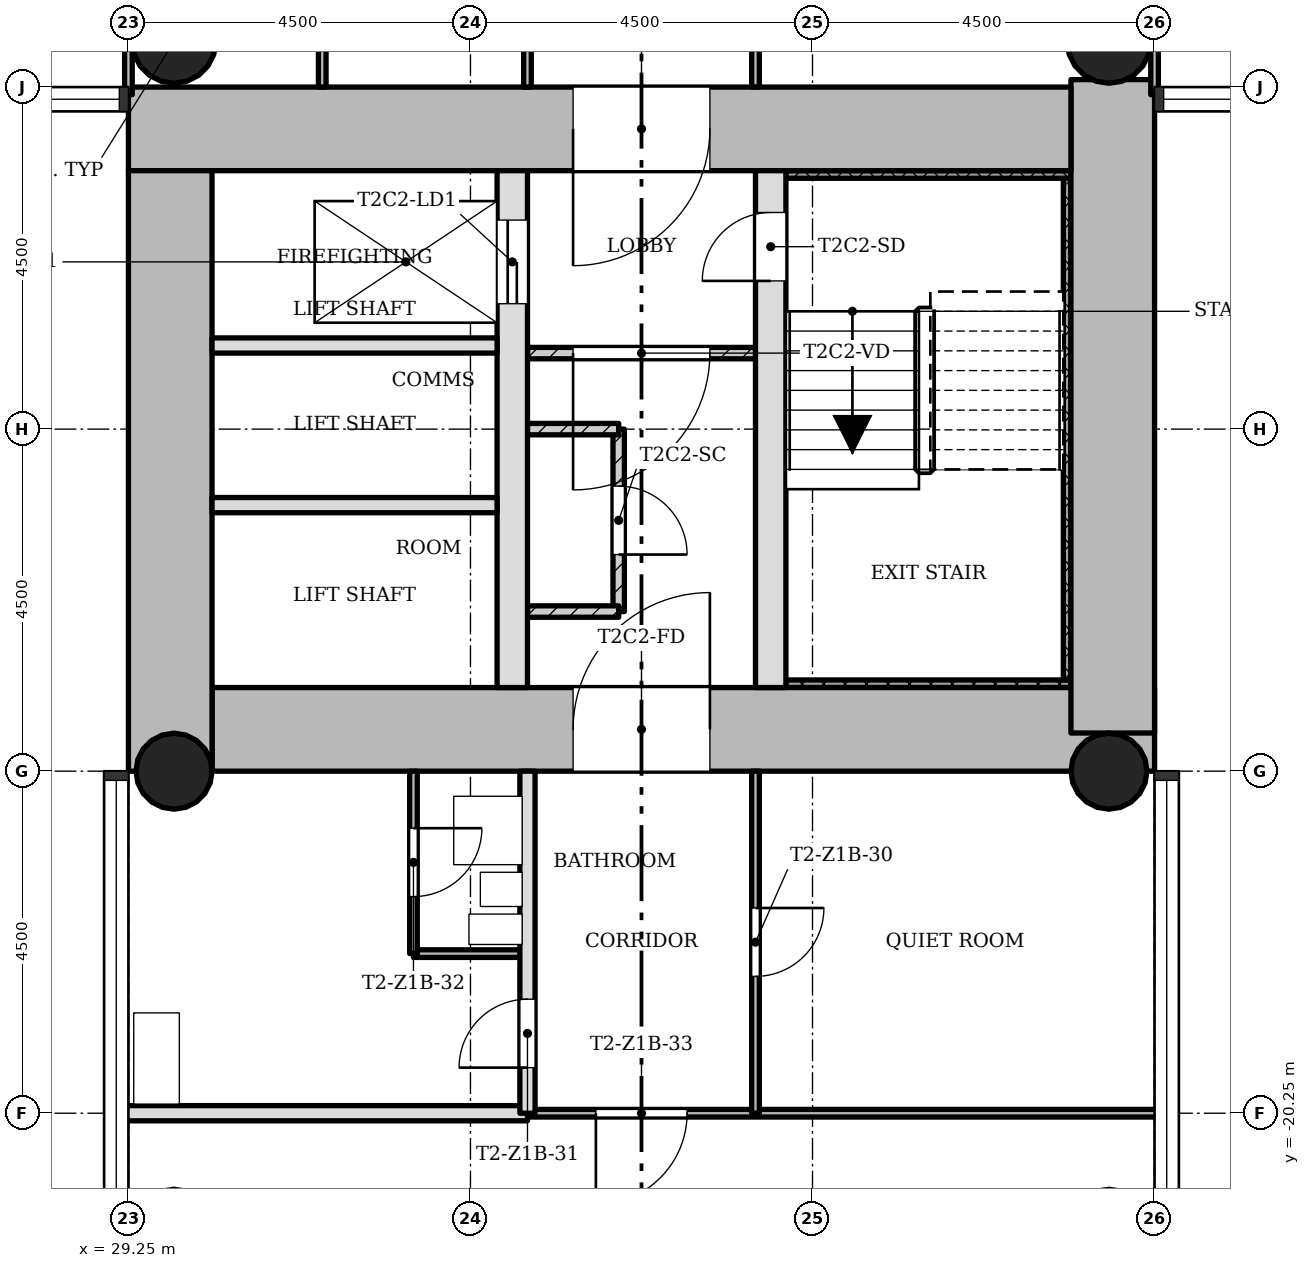
"""IFC4 building model, lengths in metres.
Left out: names, types, materials, properties, quantities, classifications, styles, units other than length and angle.
Written with IfcOpenShell. Run it as: python <this file> out.ifc"""

import sys

from ifc_helpers import new_model, si_unit, direction, frame, frame_2d, origin, origin_2d, place, context, subcontext, project, spatial, rectangle, hollow_circle, extrude, element, fill, save


model = new_model("IFC4")
c1 = context("Model", 3, precision=1e-05, world=origin(), true_north=direction((0.0, 1.0)))
c2 = subcontext(c1, "Body", "Model", "MODEL_VIEW")
j1 = project(units=[si_unit("LENGTHUNIT", "METRE"), si_unit("PLANEANGLEUNIT", "RADIAN")], contexts=[c1])
p1 = place(None, origin())
s1 = spatial("IfcSite", under=j1, at=p1, CompositionType="ELEMENT")
p2 = place(p1, origin())
s2 = spatial("IfcBuilding", under=s1, at=p2, CompositionType="ELEMENT")
p3 = place(p2, frame((0.0, 0.0, 41.5)))
s3 = spatial("IfcBuildingStorey", under=s2, at=p3, CompositionType="ELEMENT", Elevation=41.5)
p4 = place(p3, frame((30.35, -15.2, 0.0), z_axis=(0.0, 0.0, 1.0), x_axis=(1.0, 0.0, 0.0)))
e1 = element("IfcWall", 1, at=p4, inside=s3, PredefinedType="SHEAR", context=c2, shape_type="SweptSolid", body=[
    extrude(rectangle(XDim=12.4, YDim=1.1, at=frame_2d((6.2, 0.0))), origin(), (0.0, 0.0, 1.0), 3.4),
])
p5 = place(p4, frame((4.75, 0.0, 0.0)))
e2 = element("IfcOpeningElement", 2, at=p5, cuts=e1, PredefinedType="OPENING", context=c2, shape_type="SweptSolid", body=[
    extrude(rectangle(XDim=1.8, YDim=2.1, at=frame_2d((0.9, 1.05))), frame((0.0, 0.56, 0.0), z_axis=(0.0, -1.0, 0.0), x_axis=(1.0, 0.0, 0.0)), (0.0, 0.0, 1.0), 1.12),
])
p6 = place(p3, frame((42.2, -15.248, 0.0), z_axis=(0.0, 0.0, 1.0), x_axis=(0.0, 1.0, 0.0)))
e3 = element("IfcWall", 3, at=p6, inside=s3, PredefinedType="SHEAR", context=c2, shape_type="SweptSolid", body=[
    extrude(rectangle(XDim=8.596, YDim=1.1, at=frame_2d((4.298, 0.0))), origin(), (0.0, 0.0, 1.0), 3.4),
])
p7 = place(p3, frame((41.65, -7.3, 0.0), z_axis=(0.0, 0.0, 1.0), x_axis=(-1.0, 0.0, 0.0)))
e4 = element("IfcWall", 4, at=p7, inside=s3, PredefinedType="SHEAR", context=c2, shape_type="SweptSolid", body=[
    extrude(rectangle(XDim=12.4, YDim=1.1, at=frame_2d((6.2, 0.0))), origin(), (0.0, 0.0, 1.0), 3.4),
])
p8 = place(p7, frame((4.75, 0.0, 0.0)))
e5 = element("IfcOpeningElement", 5, at=p8, cuts=e4, PredefinedType="OPENING", context=c2, shape_type="SweptSolid", body=[
    extrude(rectangle(XDim=1.8, YDim=2.1, at=frame_2d((0.9, 1.05))), frame((0.0, 0.56, 0.0), z_axis=(0.0, -1.0, 0.0), x_axis=(1.0, 0.0, 0.0)), (0.0, 0.0, 1.0), 1.12),
])
p9 = place(p3, frame((29.8, -7.85, 0.0), z_axis=(0.0, 0.0, 1.0), x_axis=(0.0, -1.0, 0.0)))
e6 = element("IfcWall", 6, at=p9, inside=s3, PredefinedType="SHEAR", context=c2, shape_type="SweptSolid", body=[
    extrude(rectangle(XDim=7.9, YDim=1.1, at=frame_2d((3.95, 0.0))), origin(), (0.0, 0.0, 1.0), 3.4),
])
p10 = place(p3, frame((34.3, -14.65, 0.0), z_axis=(0.0, 0.0, 1.0), x_axis=(0.0, 1.0, 0.0)))
e7 = element("IfcWall", 7, at=p10, inside=s3, PredefinedType="SHEAR", context=c2, shape_type="SweptSolid", body=[
    extrude(rectangle(XDim=6.8, YDim=0.4, at=frame_2d((3.4, 0.0))), origin(), (0.0, 0.0, 1.0), 3.4),
])
p11 = place(p10, frame((5.05, 0.0, 0.0)))
e8 = element("IfcOpeningElement", 8, at=p11, cuts=e7, PredefinedType="OPENING", context=c2, shape_type="SweptSolid", body=[
    extrude(rectangle(XDim=1.1, YDim=2.1, at=frame_2d((0.55, 1.05))), frame((0.0, 0.21, 0.0), z_axis=(0.0, -1.0, 0.0), x_axis=(1.0, 0.0, 0.0)), (0.0, 0.0, 1.0), 0.42),
])
p12 = place(p3, frame((37.7, -14.65, 0.0), z_axis=(0.0, 0.0, 1.0), x_axis=(0.0, 1.0, 0.0)))
e9 = element("IfcWall", 9, at=p12, inside=s3, PredefinedType="SHEAR", context=c2, shape_type="SweptSolid", body=[
    extrude(rectangle(XDim=6.8, YDim=0.4, at=frame_2d((3.4, 0.0))), origin(), (0.0, 0.0, 1.0), 3.4),
])
p13 = place(p12, frame((5.35, 0.0, 0.0)))
e10 = element("IfcOpeningElement", 10, at=p13, cuts=e9, PredefinedType="OPENING", context=c2, shape_type="SweptSolid", body=[
    extrude(rectangle(XDim=0.9, YDim=2.1, at=frame_2d((0.45, 1.05))), frame((0.0, 0.21, 0.0), z_axis=(0.0, -1.0, 0.0), x_axis=(1.0, 0.0, 0.0)), (0.0, 0.0, 1.0), 0.42),
])
for number, where, z_axis, x_axis in (
    (11, (42.15, -15.75, 0.0), (0.0, 0.0, 1.0), (1.0, 0.0, 0.0)),
    (12, (29.85, -15.75, 0.0), (0.0, 0.0, 1.0), (1.0, 0.0, 0.0)),
):
    element("IfcColumn", number, at=place(p3, frame(where, z_axis=z_axis, x_axis=x_axis)), inside=s3, PredefinedType="COLUMN", context=c2, shape_type="SweptSolid", body=[
        extrude(hollow_circle(Radius=0.5, WallThickness=0.036, at=origin_2d()), origin(), (0.0, 0.0, 1.0), 3.4),
    ])
for number, where, z_axis, x_axis in (
    (13, (42.15, -6.15, 0.0), (0.0, 0.0, 1.0), (1.0, 0.0, 0.0)),
    (14, (29.85, -6.15, 0.0), (0.0, 0.0, 1.0), (1.0, 0.0, 0.0)),
):
    element("IfcColumn", number, at=place(p3, frame(where, z_axis=z_axis, x_axis=x_axis)), inside=s3, PredefinedType="COLUMN", context=c2, shape_type="SweptSolid", body=[
        extrude(hollow_circle(Radius=0.55, WallThickness=0.04, at=origin_2d()), origin(), (0.0, 0.0, 1.0), 3.4),
    ])
p14 = place(p3, frame((34.5, -10.25, 0.0), z_axis=(0.0, 0.0, 1.0), x_axis=(1.0, 0.0, 0.0)))
e15 = element("IfcWall", 15, at=p14, inside=s3, PredefinedType="PARTITIONING", context=c2, shape_type="SweptSolid", body=[
    extrude(rectangle(XDim=3.0, YDim=0.15, at=frame_2d((1.5, 0.0))), origin(), (0.0, 0.0, 1.0), 3.0),
])
p15 = place(p14, frame((0.6, 0.0, 0.0)))
e16 = element("IfcOpeningElement", 16, at=p15, cuts=e15, PredefinedType="OPENING", context=c2, shape_type="SweptSolid", body=[
    extrude(rectangle(XDim=1.8, YDim=2.1, at=frame_2d((0.9, 1.05))), frame((0.0, 0.085, 0.0), z_axis=(0.0, -1.0, 0.0), x_axis=(1.0, 0.0, 0.0)), (0.0, 0.0, 1.0), 0.17),
])
for number, where, z_axis, x_axis in (
    (17, (30.35, -10.15, 0.0), (0.0, 0.0, 1.0), (1.0, 0.0, 0.0)),
    (18, (30.35, -12.25, 0.0), (0.0, 0.0, 1.0), (1.0, 0.0, 0.0)),
):
    element("IfcWall", number, at=place(p3, frame(where, z_axis=z_axis, x_axis=x_axis)), inside=s3, PredefinedType="SOLIDWALL", context=c2, shape_type="SweptSolid", body=[
        extrude(rectangle(XDim=3.75, YDim=0.2, at=frame_2d((1.875, 0.0))), origin(), (0.0, 0.0, 1.0), 3.0),
    ])
p16 = place(p3, frame((35.7, -11.25, 0.0), z_axis=(0.0, 0.0, 1.0), x_axis=(0.0, -1.0, 0.0)))
e19 = element("IfcWall", 19, at=p16, inside=s3, PredefinedType="PARTITIONING", context=c2, shape_type="SweptSolid", body=[
    extrude(rectangle(XDim=2.4, YDim=0.15, at=frame_2d((1.2, 0.0))), origin(), (0.0, 0.0, 1.0), 3.0),
])
p17 = place(p16, frame((0.75, 0.0, 0.0)))
e20 = element("IfcOpeningElement", 20, at=p17, cuts=e19, PredefinedType="OPENING", context=c2, shape_type="SweptSolid", body=[
    extrude(rectangle(XDim=0.9, YDim=2.1, at=frame_2d((0.45, 1.05))), frame((0.0, 0.085, 0.0), z_axis=(0.0, -1.0, 0.0), x_axis=(1.0, 0.0, 0.0)), (0.0, 0.0, 1.0), 0.17),
])
for number, where, z_axis, x_axis in (
    (21, (35.7, -11.25, 0.0), (0.0, 0.0, 1.0), (-1.0, 0.0, 0.0)),
    (22, (35.7, -13.65, 0.0), (0.0, 0.0, 1.0), (-1.0, 0.0, 0.0)),
):
    element("IfcWall", number, at=place(p3, frame(where, z_axis=z_axis, x_axis=x_axis)), inside=s3, PredefinedType="PARTITIONING", context=c2, shape_type="SweptSolid", body=[
        extrude(rectangle(XDim=1.2, YDim=0.15, at=frame_2d((0.6, 0.0))), origin(), (0.0, 0.0, 1.0), 3.0),
    ])
p18 = place(p3, frame((42.85, -20.25, 0.0), z_axis=(0.0, 0.0, 1.0), x_axis=(-1.0, 0.0, 0.0)))
e23 = element("IfcWall", 23, at=p18, inside=s3, PredefinedType="PARTITIONING", context=c2, shape_type="SweptSolid", body=[
    extrude(rectangle(XDim=8.35, YDim=0.1, at=frame_2d((4.175, 0.0))), origin(), (0.0, 0.0, 1.0), 3.0),
])
p19 = place(p18, frame((6.25, 0.0, 0.0)))
e24 = element("IfcOpeningElement", 24, at=p19, cuts=e23, PredefinedType="OPENING", context=c2, shape_type="SweptSolid", body=[
    extrude(rectangle(XDim=1.2, YDim=2.1, at=frame_2d((0.6, 1.05))), frame((0.0, 0.06, 0.0), z_axis=(0.0, -1.0, 0.0), x_axis=(1.0, 0.0, 0.0)), (0.0, 0.0, 1.0), 0.12),
])
p20 = place(p3, frame((34.5, -20.25, 0.0), z_axis=(0.0, 0.0, 1.0), x_axis=(-1.0, 0.0, 0.0)))
e25 = element("IfcWall", 25, at=p20, inside=s3, PredefinedType="SOLIDWALL", context=c2, shape_type="SweptSolid", body=[
    extrude(rectangle(XDim=5.35, YDim=0.2, at=frame_2d((2.675, 0.0))), origin(), (0.0, 0.0, 1.0), 3.0),
])
p21 = place(p3, frame((34.5, -18.15, 0.0), z_axis=(0.0, 0.0, 1.0), x_axis=(-1.0, 0.0, 0.0)))
e26 = element("IfcWall", 26, at=p21, inside=s3, PredefinedType="PARTITIONING", context=c2, shape_type="SweptSolid", body=[
    extrude(rectangle(XDim=1.5, YDim=0.1, at=frame_2d((0.75, 0.0))), origin(), (0.0, 0.0, 1.0), 3.0),
])
p22 = place(p3, frame((42.75, -6.85, 0.0), z_axis=(0.0, 0.0, 1.0), x_axis=(0.0, 1.0, 0.0)))
e27 = element("IfcWall", 27, at=p22, inside=s3, PredefinedType="PARTITIONING", context=c2, shape_type="SweptSolid", body=[
    extrude(rectangle(XDim=5.95, YDim=0.1, at=frame_2d((2.975, 0.0))), origin(), (0.0, 0.0, 1.0), 3.0),
])
p23 = place(p3, frame((37.5, -20.25, 0.0), z_axis=(0.0, 0.0, 1.0), x_axis=(0.0, 1.0, 0.0)))
e28 = element("IfcWall", 28, at=p23, inside=s3, PredefinedType="PARTITIONING", context=c2, shape_type="SweptSolid", body=[
    extrude(rectangle(XDim=4.5, YDim=0.1, at=frame_2d((2.25, 0.0))), origin(), (0.0, 0.0, 1.0), 3.0),
])
p24 = place(p23, frame((1.8, 0.0, 0.0)))
e29 = element("IfcOpeningElement", 29, at=p24, cuts=e28, PredefinedType="OPENING", context=c2, shape_type="SweptSolid", body=[
    extrude(rectangle(XDim=0.9, YDim=2.1, at=frame_2d((0.45, 1.05))), frame((0.0, 0.06, 0.0), z_axis=(0.0, -1.0, 0.0), x_axis=(1.0, 0.0, 0.0)), (0.0, 0.0, 1.0), 0.12),
])
p25 = place(p3, frame((37.5, -6.75, 0.0), z_axis=(0.0, 0.0, 1.0), x_axis=(0.0, 1.0, 0.0)))
e30 = element("IfcWall", 30, at=p25, inside=s3, PredefinedType="PARTITIONING", context=c2, shape_type="SweptSolid", body=[
    extrude(rectangle(XDim=5.85, YDim=0.1, at=frame_2d((2.925, 0.0))), origin(), (0.0, 0.0, 1.0), 3.0),
])
p26 = place(p25, frame((1.575, 0.0, 0.0)))
e31 = element("IfcOpeningElement", 31, at=p26, cuts=e30, PredefinedType="OPENING", context=c2, shape_type="SweptSolid", body=[
    extrude(rectangle(XDim=0.9, YDim=2.1, at=frame_2d((0.45, 1.05))), frame((0.0, 0.06, 0.0), z_axis=(0.0, -1.0, 0.0), x_axis=(1.0, 0.0, 0.0)), (0.0, 0.0, 1.0), 0.12),
])
p27 = place(p3, frame((34.5, -6.75, 0.0), z_axis=(0.0, 0.0, 1.0), x_axis=(0.0, 1.0, 0.0)))
e32 = element("IfcWall", 32, at=p27, inside=s3, PredefinedType="PARTITIONING", context=c2, shape_type="SweptSolid", body=[
    extrude(rectangle(XDim=5.85, YDim=0.1, at=frame_2d((2.925, 0.0))), origin(), (0.0, 0.0, 1.0), 3.0),
])
p28 = place(p27, frame((2.475, 0.0, 0.0)))
e33 = element("IfcOpeningElement", 33, at=p28, cuts=e32, PredefinedType="OPENING", context=c2, shape_type="SweptSolid", body=[
    extrude(rectangle(XDim=0.9, YDim=2.1, at=frame_2d((0.45, 1.05))), frame((0.0, 0.06, 0.0), z_axis=(0.0, -1.0, 0.0), x_axis=(1.0, 0.0, 0.0)), (0.0, 0.0, 1.0), 0.12),
])
p29 = place(p3, frame((34.5, -20.25, 0.0), z_axis=(0.0, 0.0, 1.0), x_axis=(0.0, 1.0, 0.0)))
e34 = element("IfcWall", 34, at=p29, inside=s3, PredefinedType="SOLIDWALL", context=c2, shape_type="SweptSolid", body=[
    extrude(rectangle(XDim=4.5, YDim=0.2, at=frame_2d((2.25, 0.0))), origin(), (0.0, 0.0, 1.0), 3.0),
])
p30 = place(p29, frame((0.6, 0.0, 0.0)))
e35 = element("IfcOpeningElement", 35, at=p30, cuts=e34, PredefinedType="OPENING", context=c2, shape_type="SweptSolid", body=[
    extrude(rectangle(XDim=0.9, YDim=2.1, at=frame_2d((0.45, 1.05))), frame((0.0, 0.11, 0.0), z_axis=(0.0, -1.0, 0.0), x_axis=(1.0, 0.0, 0.0)), (0.0, 0.0, 1.0), 0.22),
])
p31 = place(p3, frame((33.0, -18.15, 0.0), z_axis=(0.0, 0.0, 1.0), x_axis=(0.0, 1.0, 0.0)))
e36 = element("IfcWall", 36, at=p31, inside=s3, PredefinedType="PARTITIONING", context=c2, shape_type="SweptSolid", body=[
    extrude(rectangle(XDim=2.4, YDim=0.1, at=frame_2d((1.2, 0.0))), origin(), (0.0, 0.0, 1.0), 3.0),
])
p32 = place(p31, frame((0.75, 0.0, 0.0)))
e37 = element("IfcOpeningElement", 37, at=p32, cuts=e36, PredefinedType="OPENING", context=c2, shape_type="SweptSolid", body=[
    extrude(rectangle(XDim=0.9, YDim=2.1, at=frame_2d((0.45, 1.05))), frame((0.0, 0.06, 0.0), z_axis=(0.0, -1.0, 0.0), x_axis=(1.0, 0.0, 0.0)), (0.0, 0.0, 1.0), 0.12),
])
p33 = place(p3, frame((31.8, -6.75, 0.0), z_axis=(0.0, 0.0, 1.0), x_axis=(0.0, 1.0, 0.0)))
e38 = element("IfcWall", 38, at=p33, inside=s3, PredefinedType="PARTITIONING", context=c2, shape_type="SweptSolid", body=[
    extrude(rectangle(XDim=5.85, YDim=0.1, at=frame_2d((2.925, 0.0))), origin(), (0.0, 0.0, 1.0), 3.0),
])
p34 = place(p3, frame((29.25, -6.85, 0.0), z_axis=(0.0, 0.0, 1.0), x_axis=(0.0, 1.0, 0.0)))
e39 = element("IfcWall", 39, at=p34, inside=s3, PredefinedType="PARTITIONING", context=c2, shape_type="SweptSolid", body=[
    extrude(rectangle(XDim=5.95, YDim=0.1, at=frame_2d((2.975, 0.0))), origin(), (0.0, 0.0, 1.0), 3.0),
])
p35 = place(p3, frame((37.9, -14.6, 0.0), z_axis=(0.0, 0.0, 1.0), x_axis=(1.0, 0.0, 0.0)))
e40 = element("IfcWall", 40, at=p35, inside=s3, PredefinedType="SHEAR", context=c2, shape_type="SweptSolid", body=[
    extrude(rectangle(XDim=3.75, YDim=0.1, at=frame_2d((1.875, 0.0))), origin(), (0.0, 0.0, 1.0), 3.4),
])
p36 = place(p3, frame((41.6, -7.95, 0.0), z_axis=(0.0, 0.0, 1.0), x_axis=(0.0, -1.0, 0.0)))
e41 = element("IfcWall", 41, at=p36, inside=s3, PredefinedType="SHEAR", context=c2, shape_type="SweptSolid", body=[
    extrude(rectangle(XDim=6.6, YDim=0.1, at=frame_2d((3.3, 0.0))), origin(), (0.0, 0.0, 1.0), 3.4),
])
p37 = place(p3, frame((37.9, -7.9, 0.0), z_axis=(0.0, 0.0, 1.0), x_axis=(1.0, 0.0, 0.0)))
e42 = element("IfcWall", 42, at=p37, inside=s3, PredefinedType="SHEAR", context=c2, shape_type="SweptSolid", body=[
    extrude(rectangle(XDim=3.75, YDim=0.1, at=frame_2d((1.875, 0.0))), origin(), (0.0, 0.0, 1.0), 3.4),
])
p38 = place(p15, origin())
e43 = element("IfcDoor", 43, at=p38, inside=s3, OperationType="SINGLE_SWING_LEFT", PredefinedType="DOOR", context=c2, shape_type="SweptSolid", body=[
    extrude(rectangle(XDim=1.8, YDim=2.1, at=frame_2d((0.9, 1.05))), frame((0.0, 0.025, 0.0), z_axis=(0.0, -1.0, 0.0), x_axis=(1.0, 0.0, 0.0)), (0.0, 0.0, 1.0), 0.05),
])
fill(e16, e43)
p39 = place(p17, origin())
e44 = element("IfcDoor", 44, at=p39, inside=s3, OperationType="SINGLE_SWING_LEFT", PredefinedType="DOOR", context=c2, shape_type="SweptSolid", body=[
    extrude(rectangle(XDim=0.9, YDim=2.1, at=frame_2d((0.45, 1.05))), frame((0.0, 0.025, 0.0), z_axis=(0.0, -1.0, 0.0), x_axis=(1.0, 0.0, 0.0)), (0.0, 0.0, 1.0), 0.05),
])
fill(e20, e44)
p40 = place(p24, origin())
e45 = element("IfcDoor", 45, at=p40, inside=s3, OperationType="SINGLE_SWING_RIGHT", PredefinedType="DOOR", context=c2, shape_type="SweptSolid", body=[
    extrude(rectangle(XDim=0.9, YDim=2.1, at=frame_2d((0.45, 1.05))), frame((0.0, 0.025, 0.0), z_axis=(0.0, -1.0, 0.0), x_axis=(1.0, 0.0, 0.0)), (0.0, 0.0, 1.0), 0.05),
])
fill(e29, e45)
p41 = place(p30, origin())
e46 = element("IfcDoor", 46, at=p41, inside=s3, OperationType="SINGLE_SWING_RIGHT", PredefinedType="DOOR", context=c2, shape_type="SweptSolid", body=[
    extrude(rectangle(XDim=0.9, YDim=2.1, at=frame_2d((0.45, 1.05))), frame((0.0, 0.025, 0.0), z_axis=(0.0, -1.0, 0.0), x_axis=(1.0, 0.0, 0.0)), (0.0, 0.0, 1.0), 0.05),
])
fill(e35, e46)
p42 = place(p32, origin())
e47 = element("IfcDoor", 47, at=p42, inside=s3, OperationType="SINGLE_SWING_RIGHT", PredefinedType="DOOR", context=c2, shape_type="SweptSolid", body=[
    extrude(rectangle(XDim=0.9, YDim=2.1, at=frame_2d((0.45, 1.05))), frame((0.0, 0.025, 0.0), z_axis=(0.0, -1.0, 0.0), x_axis=(1.0, 0.0, 0.0)), (0.0, 0.0, 1.0), 0.05),
])
fill(e37, e47)
p43 = place(p19, origin())
e48 = element("IfcDoor", 48, at=p43, inside=s3, OperationType="SINGLE_SWING_LEFT", PredefinedType="DOOR", context=c2, shape_type="SweptSolid", body=[
    extrude(rectangle(XDim=1.2, YDim=2.1, at=frame_2d((0.6, 1.05))), frame((0.0, 0.025, 0.0), z_axis=(0.0, -1.0, 0.0), x_axis=(1.0, 0.0, 0.0)), (0.0, 0.0, 1.0), 0.05),
])
fill(e24, e48)
p44 = place(p13, origin())
e49 = element("IfcDoor", 49, at=p44, inside=s3, OperationType="SINGLE_SWING_RIGHT", PredefinedType="DOOR", context=c2, shape_type="SweptSolid", body=[
    extrude(rectangle(XDim=0.9, YDim=2.1, at=frame_2d((0.45, 1.05))), frame((0.0, 0.025, 0.0), z_axis=(0.0, -1.0, 0.0), x_axis=(1.0, 0.0, 0.0)), (0.0, 0.0, 1.0), 0.05),
])
fill(e10, e49)
p45 = place(p11, origin())
e50 = element("IfcDoor", 50, at=p45, inside=s3, OperationType="SLIDING_TO_LEFT", PredefinedType="DOOR", context=c2, shape_type="SweptSolid", body=[
    extrude(rectangle(XDim=1.1, YDim=2.1, at=frame_2d((0.55, 1.05))), frame((0.0, 0.025, 0.0), z_axis=(0.0, -1.0, 0.0), x_axis=(1.0, 0.0, 0.0)), (0.0, 0.0, 1.0), 0.05),
])
fill(e8, e50)
p46 = place(p8, origin())
e51 = element("IfcDoor", 51, at=p46, inside=s3, OperationType="SINGLE_SWING_LEFT", PredefinedType="DOOR", context=c2, shape_type="SweptSolid", body=[
    extrude(rectangle(XDim=1.8, YDim=2.1, at=frame_2d((0.9, 1.05))), frame((0.0, 0.025, 0.0), z_axis=(0.0, -1.0, 0.0), x_axis=(1.0, 0.0, 0.0)), (0.0, 0.0, 1.0), 0.05),
])
fill(e5, e51)
p47 = place(p5, origin())
e52 = element("IfcDoor", 52, at=p47, inside=s3, OperationType="SINGLE_SWING_LEFT", PredefinedType="DOOR", context=c2, shape_type="SweptSolid", body=[
    extrude(rectangle(XDim=1.8, YDim=2.1, at=frame_2d((0.9, 1.05))), frame((0.0, 0.025, 0.0), z_axis=(0.0, -1.0, 0.0), x_axis=(1.0, 0.0, 0.0)), (0.0, 0.0, 1.0), 0.05),
])
fill(e2, e52)
save(model, sys.argv[1])
